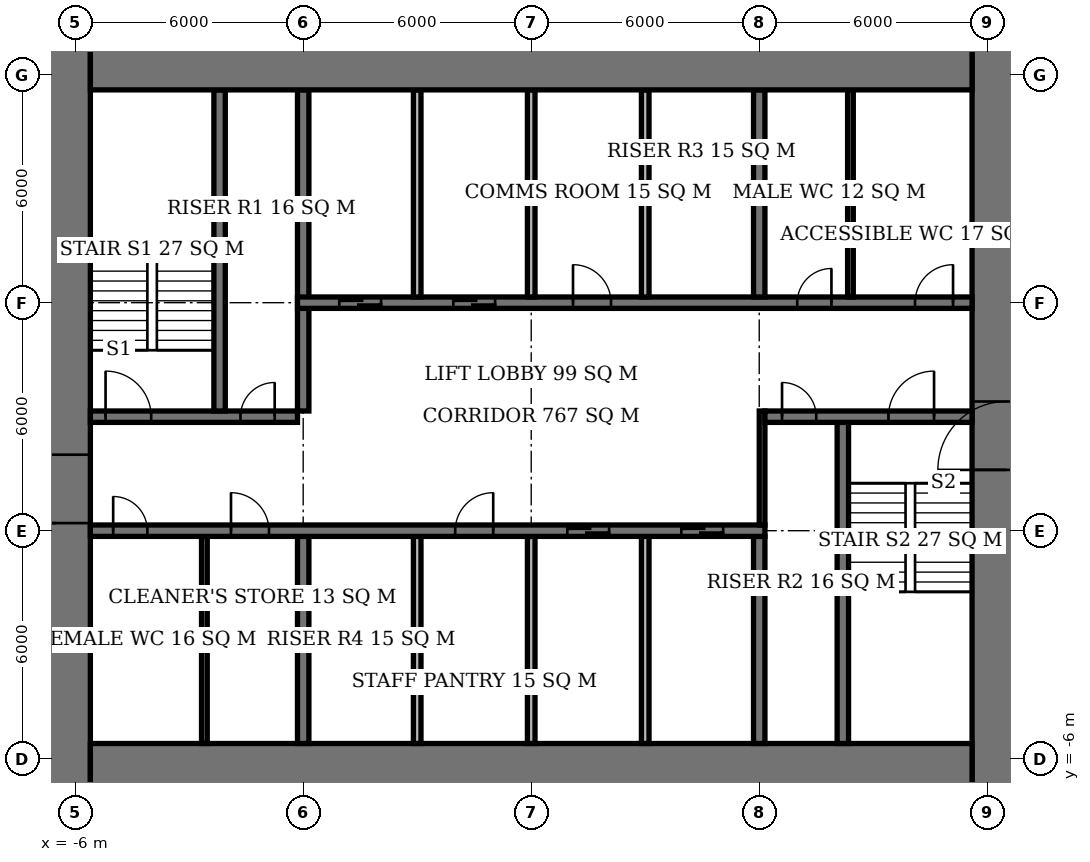
"""IFC4 building model, lengths in metres.
Left out: names, types, materials, properties, quantities, classifications, styles, units other than length and angle.
Written with IfcOpenShell. Run it as: python <this file> out.ifc"""

import sys

from ifc_helpers import new_model, si_unit, direction, frame, frame_2d, origin, place, context, subcontext, project, spatial, rectangle, extrude, element, fill, save


model = new_model("IFC4")
c1 = context("Model", 3, precision=1e-05, world=origin(), true_north=direction((0.0, 1.0)))
c2 = subcontext(c1, "Body", "Model", "MODEL_VIEW")
j1 = project(units=[si_unit("LENGTHUNIT", "METRE"), si_unit("PLANEANGLEUNIT", "RADIAN")], contexts=[c1])
p1 = place(None, origin())
s1 = spatial("IfcSite", under=j1, at=p1, CompositionType="ELEMENT")
p2 = place(p1, origin())
s2 = spatial("IfcBuilding", under=s1, at=p2, CompositionType="ELEMENT")
p3 = place(p2, frame((0.0, 0.0, 212.3)))
s3 = spatial("IfcBuildingStorey", under=s2, at=p3, CompositionType="ELEMENT", Elevation=212.3)
for number, where, z_axis, x_axis in (
    (1, (-5.6, -6.6, 0.0), (0.0, 0.0, 1.0), (1.0, 0.0, 0.0)),
    (2, (-5.6, 12.6, 0.0), (0.0, 0.0, 1.0), (1.0, 0.0, 0.0)),
):
    element("IfcWall", number, at=place(p3, frame(where, z_axis=z_axis, x_axis=x_axis)), inside=s3, PredefinedType="SHEAR", context=c2, shape_type="SweptSolid", body=[
        extrude(rectangle(XDim=23.2, YDim=2.0, at=frame_2d((11.6, 0.0))), origin(), (0.0, 0.0, 1.0), 3.9),
    ])
p4 = place(p3, frame((-6.5, -7.6, 0.0), z_axis=(0.0, 0.0, 1.0), x_axis=(0.0, 1.0, 0.0)))
e3 = element("IfcWall", 3, at=p4, inside=s3, PredefinedType="SHEAR", context=c2, shape_type="SweptSolid", body=[
    extrude(rectangle(XDim=21.2, YDim=1.8, at=frame_2d((10.6, 0.0))), origin(), (0.0, 0.0, 1.0), 3.9),
])
p5 = place(p4, frame((7.8, 0.0, 0.0)))
e4 = element("IfcOpeningElement", 4, at=p5, cuts=e3, PredefinedType="OPENING", context=c2, shape_type="SweptSolid", body=[
    extrude(rectangle(XDim=1.8, YDim=2.4, at=frame_2d((0.9, 1.2))), frame((0.0, 0.91, 0.0), z_axis=(0.0, -1.0, 0.0), x_axis=(1.0, 0.0, 0.0)), (0.0, 0.0, 1.0), 1.82),
])
p6 = place(p3, frame((18.5, -7.6, 0.0), z_axis=(0.0, 0.0, 1.0), x_axis=(0.0, 1.0, 0.0)))
e5 = element("IfcWall", 5, at=p6, inside=s3, PredefinedType="SHEAR", context=c2, shape_type="SweptSolid", body=[
    extrude(rectangle(XDim=21.2, YDim=1.8, at=frame_2d((10.6, 0.0))), origin(), (0.0, 0.0, 1.0), 3.9),
])
p7 = place(p6, frame((9.2, 0.0, 0.0)))
e6 = element("IfcOpeningElement", 6, at=p7, cuts=e5, PredefinedType="OPENING", context=c2, shape_type="SweptSolid", body=[
    extrude(rectangle(XDim=1.8, YDim=2.4, at=frame_2d((0.9, 1.2))), frame((0.0, 0.91, 0.0), z_axis=(0.0, -1.0, 0.0), x_axis=(1.0, 0.0, 0.0)), (0.0, 0.0, 1.0), 1.82),
])
p8 = place(p3, frame((-5.6, 0.0, 0.0), z_axis=(0.0, 0.0, 1.0), x_axis=(1.0, 0.0, 0.0)))
e7 = element("IfcWall", 7, at=p8, inside=s3, PredefinedType="SHEAR", context=c2, shape_type="SweptSolid", body=[
    extrude(rectangle(XDim=17.75, YDim=0.3, at=frame_2d((8.875, 0.0))), origin(), (0.0, 0.0, 1.0), 3.9),
])
p9 = place(p8, frame((0.6, 0.0, 0.0)))
e8 = element("IfcOpeningElement", 8, at=p9, cuts=e7, PredefinedType="OPENING", context=c2, shape_type="SweptSolid", body=[
    extrude(rectangle(XDim=0.9, YDim=2.1, at=frame_2d((0.45, 1.05))), frame((0.0, 0.16, 0.0), z_axis=(0.0, -1.0, 0.0), x_axis=(1.0, 0.0, 0.0)), (0.0, 0.0, 1.0), 0.32),
])
p10 = place(p8, frame((3.7, 0.0, 0.0)))
e9 = element("IfcOpeningElement", 9, at=p10, cuts=e7, PredefinedType="OPENING", context=c2, shape_type="SweptSolid", body=[
    extrude(rectangle(XDim=1.0, YDim=2.1, at=frame_2d((0.5, 1.05))), frame((0.0, 0.16, 0.0), z_axis=(0.0, -1.0, 0.0), x_axis=(1.0, 0.0, 0.0)), (0.0, 0.0, 1.0), 0.32),
])
p11 = place(p8, frame((9.6, 0.0, 0.0)))
e10 = element("IfcOpeningElement", 10, at=p11, cuts=e7, PredefinedType="OPENING", context=c2, shape_type="SweptSolid", body=[
    extrude(rectangle(XDim=1.0, YDim=2.1, at=frame_2d((0.5, 1.05))), frame((0.0, 0.16, 0.0), z_axis=(0.0, -1.0, 0.0), x_axis=(1.0, 0.0, 0.0)), (0.0, 0.0, 1.0), 0.32),
])
p12 = place(p8, frame((12.55, 0.0, 0.0)))
e11 = element("IfcOpeningElement", 11, at=p12, cuts=e7, PredefinedType="OPENING", context=c2, shape_type="SweptSolid", body=[
    extrude(rectangle(XDim=1.1, YDim=2.1, at=frame_2d((0.55, 1.05))), frame((0.0, 0.16, 0.0), z_axis=(0.0, -1.0, 0.0), x_axis=(1.0, 0.0, 0.0)), (0.0, 0.0, 1.0), 0.32),
])
p13 = place(p8, frame((15.55, 0.0, 0.0)))
e12 = element("IfcOpeningElement", 12, at=p13, cuts=e7, PredefinedType="OPENING", context=c2, shape_type="SweptSolid", body=[
    extrude(rectangle(XDim=1.1, YDim=2.1, at=frame_2d((0.55, 1.05))), frame((0.0, 0.16, 0.0), z_axis=(0.0, -1.0, 0.0), x_axis=(1.0, 0.0, 0.0)), (0.0, 0.0, 1.0), 0.32),
])
p14 = place(p3, frame((-5.6, 3.0, 0.0), z_axis=(0.0, 0.0, 1.0), x_axis=(1.0, 0.0, 0.0)))
e13 = element("IfcWall", 13, at=p14, inside=s3, PredefinedType="SHEAR", context=c2, shape_type="SweptSolid", body=[
    extrude(rectangle(XDim=5.45, YDim=0.3, at=frame_2d((2.725, 0.0))), origin(), (0.0, 0.0, 1.0), 3.9),
])
p15 = place(p14, frame((0.4, 0.0, 0.0)))
e14 = element("IfcOpeningElement", 14, at=p15, cuts=e13, PredefinedType="OPENING", context=c2, shape_type="SweptSolid", body=[
    extrude(rectangle(XDim=1.2, YDim=2.1, at=frame_2d((0.6, 1.05))), frame((0.0, 0.16, 0.0), z_axis=(0.0, -1.0, 0.0), x_axis=(1.0, 0.0, 0.0)), (0.0, 0.0, 1.0), 0.32),
])
p16 = place(p14, frame((3.95, 0.0, 0.0)))
e15 = element("IfcOpeningElement", 15, at=p16, cuts=e13, PredefinedType="OPENING", context=c2, shape_type="SweptSolid", body=[
    extrude(rectangle(XDim=0.9, YDim=2.1, at=frame_2d((0.45, 1.05))), frame((0.0, 0.16, 0.0), z_axis=(0.0, -1.0, 0.0), x_axis=(1.0, 0.0, 0.0)), (0.0, 0.0, 1.0), 0.32),
])
p17 = place(p3, frame((12.15, 3.0, 0.0), z_axis=(0.0, 0.0, 1.0), x_axis=(1.0, 0.0, 0.0)))
e16 = element("IfcWall", 16, at=p17, inside=s3, PredefinedType="SHEAR", context=c2, shape_type="SweptSolid", body=[
    extrude(rectangle(XDim=5.45, YDim=0.3, at=frame_2d((2.725, 0.0))), origin(), (0.0, 0.0, 1.0), 3.9),
])
p18 = place(p17, frame((3.25, 0.0, 0.0)))
e17 = element("IfcOpeningElement", 17, at=p18, cuts=e16, PredefinedType="OPENING", context=c2, shape_type="SweptSolid", body=[
    extrude(rectangle(XDim=1.2, YDim=2.1, at=frame_2d((0.6, 1.05))), frame((0.0, 0.16, 0.0), z_axis=(0.0, -1.0, 0.0), x_axis=(1.0, 0.0, 0.0)), (0.0, 0.0, 1.0), 0.32),
])
p19 = place(p17, frame((0.45, 0.0, 0.0)))
e18 = element("IfcOpeningElement", 18, at=p19, cuts=e16, PredefinedType="OPENING", context=c2, shape_type="SweptSolid", body=[
    extrude(rectangle(XDim=0.9, YDim=2.1, at=frame_2d((0.45, 1.05))), frame((0.0, 0.16, 0.0), z_axis=(0.0, -1.0, 0.0), x_axis=(1.0, 0.0, 0.0)), (0.0, 0.0, 1.0), 0.32),
])
p20 = place(p3, frame((-0.15, 6.0, 0.0), z_axis=(0.0, 0.0, 1.0), x_axis=(1.0, 0.0, 0.0)))
e19 = element("IfcWall", 19, at=p20, inside=s3, PredefinedType="SHEAR", context=c2, shape_type="SweptSolid", body=[
    extrude(rectangle(XDim=17.75, YDim=0.3, at=frame_2d((8.875, 0.0))), origin(), (0.0, 0.0, 1.0), 3.9),
])
p21 = place(p20, frame((13.15, 0.0, 0.0)))
e20 = element("IfcOpeningElement", 20, at=p21, cuts=e19, PredefinedType="OPENING", context=c2, shape_type="SweptSolid", body=[
    extrude(rectangle(XDim=0.9, YDim=2.1, at=frame_2d((0.45, 1.05))), frame((0.0, 0.16, 0.0), z_axis=(0.0, -1.0, 0.0), x_axis=(1.0, 0.0, 0.0)), (0.0, 0.0, 1.0), 0.32),
])
p22 = place(p20, frame((16.25, 0.0, 0.0)))
e21 = element("IfcOpeningElement", 21, at=p22, cuts=e19, PredefinedType="OPENING", context=c2, shape_type="SweptSolid", body=[
    extrude(rectangle(XDim=1.0, YDim=2.1, at=frame_2d((0.5, 1.05))), frame((0.0, 0.16, 0.0), z_axis=(0.0, -1.0, 0.0), x_axis=(1.0, 0.0, 0.0)), (0.0, 0.0, 1.0), 0.32),
])
p23 = place(p20, frame((7.25, 0.0, 0.0)))
e22 = element("IfcOpeningElement", 22, at=p23, cuts=e19, PredefinedType="OPENING", context=c2, shape_type="SweptSolid", body=[
    extrude(rectangle(XDim=1.0, YDim=2.1, at=frame_2d((0.5, 1.05))), frame((0.0, 0.16, 0.0), z_axis=(0.0, -1.0, 0.0), x_axis=(1.0, 0.0, 0.0)), (0.0, 0.0, 1.0), 0.32),
])
p24 = place(p20, frame((1.1, 0.0, 0.0)))
e23 = element("IfcOpeningElement", 23, at=p24, cuts=e19, PredefinedType="OPENING", context=c2, shape_type="SweptSolid", body=[
    extrude(rectangle(XDim=1.1, YDim=2.1, at=frame_2d((0.55, 1.05))), frame((0.0, 0.16, 0.0), z_axis=(0.0, -1.0, 0.0), x_axis=(1.0, 0.0, 0.0)), (0.0, 0.0, 1.0), 0.32),
])
p25 = place(p20, frame((4.1, 0.0, 0.0)))
e24 = element("IfcOpeningElement", 24, at=p25, cuts=e19, PredefinedType="OPENING", context=c2, shape_type="SweptSolid", body=[
    extrude(rectangle(XDim=1.1, YDim=2.1, at=frame_2d((0.55, 1.05))), frame((0.0, 0.16, 0.0), z_axis=(0.0, -1.0, 0.0), x_axis=(1.0, 0.0, 0.0)), (0.0, 0.0, 1.0), 0.32),
])
p26 = place(p3, frame((0.0, -5.6, 0.0), z_axis=(0.0, 0.0, 1.0), x_axis=(0.0, 1.0, 0.0)))
e25 = element("IfcWall", 25, at=p26, inside=s3, PredefinedType="SHEAR", context=c2, shape_type="SweptSolid", body=[
    extrude(rectangle(XDim=5.45, YDim=0.3, at=frame_2d((2.725, 0.0))), origin(), (0.0, 0.0, 1.0), 3.9),
])
p27 = place(p3, frame((0.0, 3.15, 0.0), z_axis=(0.0, 0.0, 1.0), x_axis=(0.0, 1.0, 0.0)))
e26 = element("IfcWall", 26, at=p27, inside=s3, PredefinedType="SHEAR", context=c2, shape_type="SweptSolid", body=[
    extrude(rectangle(XDim=8.45, YDim=0.3, at=frame_2d((4.225, 0.0))), origin(), (0.0, 0.0, 1.0), 3.9),
])
for number, where, z_axis, x_axis in (
    (27, (12.0, -5.6, 0.0), (0.0, 0.0, 1.0), (0.0, 1.0, 0.0)),
    (28, (12.0, 6.15, 0.0), (0.0, 0.0, 1.0), (0.0, 1.0, 0.0)),
):
    element("IfcWall", number, at=place(p3, frame(where, z_axis=z_axis, x_axis=x_axis)), inside=s3, PredefinedType="SHEAR", context=c2, shape_type="SweptSolid", body=[
        extrude(rectangle(XDim=5.45, YDim=0.3, at=frame_2d((2.725, 0.0))), origin(), (0.0, 0.0, 1.0), 3.9),
    ])
for number, where, z_axis, x_axis in (
    (29, (-2.2, 3.15, 0.0), (0.0, 0.0, 1.0), (0.0, 1.0, 0.0)),
    (30, (14.2, -5.6, 0.0), (0.0, 0.0, 1.0), (0.0, 1.0, 0.0)),
):
    element("IfcWall", number, at=place(p3, frame(where, z_axis=z_axis, x_axis=x_axis)), inside=s3, PredefinedType="SHEAR", context=c2, shape_type="SweptSolid", body=[
        extrude(rectangle(XDim=8.45, YDim=0.3, at=frame_2d((4.225, 0.0))), origin(), (0.0, 0.0, 1.0), 3.9),
    ])
for number, where, z_axis, x_axis in (
    (31, (3.0, 6.15, 0.0), (0.0, 0.0, 1.0), (0.0, 1.0, 0.0)),
    (32, (6.0, 6.15, 0.0), (0.0, 0.0, 1.0), (0.0, 1.0, 0.0)),
    (33, (9.0, 6.15, 0.0), (0.0, 0.0, 1.0), (0.0, 1.0, 0.0)),
    (34, (3.0, -5.6, 0.0), (0.0, 0.0, 1.0), (0.0, 1.0, 0.0)),
    (35, (6.0, -5.6, 0.0), (0.0, 0.0, 1.0), (0.0, 1.0, 0.0)),
    (36, (9.0, -5.6, 0.0), (0.0, 0.0, 1.0), (0.0, 1.0, 0.0)),
):
    element("IfcWall", number, at=place(p3, frame(where, z_axis=z_axis, x_axis=x_axis)), inside=s3, PredefinedType="SOLIDWALL", context=c2, shape_type="SweptSolid", body=[
        extrude(rectangle(XDim=5.45, YDim=0.2, at=frame_2d((2.725, 0.0))), origin(), (0.0, 0.0, 1.0), 3.9),
    ])
for number, where, z_axis, x_axis in (
    (37, (-2.6, -5.6, 0.0), (0.0, 0.0, 1.0), (0.0, 1.0, 0.0)),
    (38, (14.4, 6.15, 0.0), (0.0, 0.0, 1.0), (0.0, 1.0, 0.0)),
):
    element("IfcWall", number, at=place(p3, frame(where, z_axis=z_axis, x_axis=x_axis)), inside=s3, PredefinedType="PLUMBINGWALL", context=c2, shape_type="SweptSolid", body=[
        extrude(rectangle(XDim=5.45, YDim=0.15, at=frame_2d((2.725, 0.0))), origin(), (0.0, 0.0, 1.0), 3.65),
    ])
p28 = place(p3, frame((12.075, 0.15, 0.0), z_axis=(0.0, 0.0, 1.0), x_axis=(0.0, 1.0, 0.0)))
e39 = element("IfcWall", 39, at=p28, inside=s3, PredefinedType="PARTITIONING", context=c2, shape_type="SweptSolid", body=[
    extrude(rectangle(XDim=3.0, YDim=0.15, at=frame_2d((1.5, 0.0))), origin(), (0.0, 0.0, 1.0), 3.65),
])
p29 = place(p5, origin())
e40 = element("IfcDoor", 40, at=p29, inside=s3, OperationType="DOUBLE_DOOR_SINGLE_SWING", PredefinedType="DOOR", context=c2, shape_type="SweptSolid", body=[
    extrude(rectangle(XDim=1.8, YDim=2.4, at=frame_2d((0.9, 1.2))), frame((0.0, 0.025, 0.0), z_axis=(0.0, -1.0, 0.0), x_axis=(1.0, 0.0, 0.0)), (0.0, 0.0, 1.0), 0.05),
])
fill(e4, e40)
p30 = place(p7, origin())
e41 = element("IfcDoor", 41, at=p30, inside=s3, OperationType="DOUBLE_DOOR_SINGLE_SWING", PredefinedType="DOOR", context=c2, shape_type="SweptSolid", body=[
    extrude(rectangle(XDim=1.8, YDim=2.4, at=frame_2d((0.9, 1.2))), frame((0.0, 0.025, 0.0), z_axis=(0.0, -1.0, 0.0), x_axis=(1.0, 0.0, 0.0)), (0.0, 0.0, 1.0), 0.05),
])
fill(e6, e41)
p31 = place(p15, origin())
e42 = element("IfcDoor", 42, at=p31, inside=s3, OperationType="SINGLE_SWING_LEFT", PredefinedType="DOOR", context=c2, shape_type="SweptSolid", body=[
    extrude(rectangle(XDim=1.2, YDim=2.1, at=frame_2d((0.6, 1.05))), frame((0.0, 0.025, 0.0), z_axis=(0.0, -1.0, 0.0), x_axis=(1.0, 0.0, 0.0)), (0.0, 0.0, 1.0), 0.05),
])
fill(e14, e42)
p32 = place(p16, origin())
e43 = element("IfcDoor", 43, at=p32, inside=s3, OperationType="SINGLE_SWING_RIGHT", PredefinedType="DOOR", context=c2, shape_type="SweptSolid", body=[
    extrude(rectangle(XDim=0.9, YDim=2.1, at=frame_2d((0.45, 1.05))), frame((0.0, 0.025, 0.0), z_axis=(0.0, -1.0, 0.0), x_axis=(1.0, 0.0, 0.0)), (0.0, 0.0, 1.0), 0.05),
])
fill(e15, e43)
p33 = place(p18, origin())
e44 = element("IfcDoor", 44, at=p33, inside=s3, OperationType="SINGLE_SWING_RIGHT", PredefinedType="DOOR", context=c2, shape_type="SweptSolid", body=[
    extrude(rectangle(XDim=1.2, YDim=2.1, at=frame_2d((0.6, 1.05))), frame((0.0, 0.025, 0.0), z_axis=(0.0, -1.0, 0.0), x_axis=(1.0, 0.0, 0.0)), (0.0, 0.0, 1.0), 0.05),
])
fill(e17, e44)
p34 = place(p19, origin())
e45 = element("IfcDoor", 45, at=p34, inside=s3, OperationType="SINGLE_SWING_LEFT", PredefinedType="DOOR", context=c2, shape_type="SweptSolid", body=[
    extrude(rectangle(XDim=0.9, YDim=2.1, at=frame_2d((0.45, 1.05))), frame((0.0, 0.025, 0.0), z_axis=(0.0, -1.0, 0.0), x_axis=(1.0, 0.0, 0.0)), (0.0, 0.0, 1.0), 0.05),
])
fill(e18, e45)
p35 = place(p9, origin())
e46 = element("IfcDoor", 46, at=p35, inside=s3, OperationType="SINGLE_SWING_LEFT", PredefinedType="DOOR", context=c2, shape_type="SweptSolid", body=[
    extrude(rectangle(XDim=0.9, YDim=2.1, at=frame_2d((0.45, 1.05))), frame((0.0, 0.025, 0.0), z_axis=(0.0, -1.0, 0.0), x_axis=(1.0, 0.0, 0.0)), (0.0, 0.0, 1.0), 0.05),
])
fill(e8, e46)
p36 = place(p10, origin())
e47 = element("IfcDoor", 47, at=p36, inside=s3, OperationType="SINGLE_SWING_LEFT", PredefinedType="DOOR", context=c2, shape_type="SweptSolid", body=[
    extrude(rectangle(XDim=1.0, YDim=2.1, at=frame_2d((0.5, 1.05))), frame((0.0, 0.025, 0.0), z_axis=(0.0, -1.0, 0.0), x_axis=(1.0, 0.0, 0.0)), (0.0, 0.0, 1.0), 0.05),
])
fill(e9, e47)
p37 = place(p21, origin())
e48 = element("IfcDoor", 48, at=p37, inside=s3, OperationType="SINGLE_SWING_RIGHT", PredefinedType="DOOR", context=c2, shape_type="SweptSolid", body=[
    extrude(rectangle(XDim=0.9, YDim=2.1, at=frame_2d((0.45, 1.05))), frame((0.0, 0.025, 0.0), z_axis=(0.0, -1.0, 0.0), x_axis=(1.0, 0.0, 0.0)), (0.0, 0.0, 1.0), 0.05),
])
fill(e20, e48)
p38 = place(p22, origin())
e49 = element("IfcDoor", 49, at=p38, inside=s3, OperationType="SINGLE_SWING_RIGHT", PredefinedType="DOOR", context=c2, shape_type="SweptSolid", body=[
    extrude(rectangle(XDim=1.0, YDim=2.1, at=frame_2d((0.5, 1.05))), frame((0.0, 0.025, 0.0), z_axis=(0.0, -1.0, 0.0), x_axis=(1.0, 0.0, 0.0)), (0.0, 0.0, 1.0), 0.05),
])
fill(e21, e49)
p39 = place(p23, origin())
e50 = element("IfcDoor", 50, at=p39, inside=s3, OperationType="SINGLE_SWING_LEFT", PredefinedType="DOOR", context=c2, shape_type="SweptSolid", body=[
    extrude(rectangle(XDim=1.0, YDim=2.1, at=frame_2d((0.5, 1.05))), frame((0.0, 0.025, 0.0), z_axis=(0.0, -1.0, 0.0), x_axis=(1.0, 0.0, 0.0)), (0.0, 0.0, 1.0), 0.05),
])
fill(e22, e50)
p40 = place(p11, origin())
e51 = element("IfcDoor", 51, at=p40, inside=s3, OperationType="SINGLE_SWING_RIGHT", PredefinedType="DOOR", context=c2, shape_type="SweptSolid", body=[
    extrude(rectangle(XDim=1.0, YDim=2.1, at=frame_2d((0.5, 1.05))), frame((0.0, 0.025, 0.0), z_axis=(0.0, -1.0, 0.0), x_axis=(1.0, 0.0, 0.0)), (0.0, 0.0, 1.0), 0.05),
])
fill(e10, e51)
p41 = place(p24, origin())
e52 = element("IfcDoor", 52, at=p41, inside=s3, OperationType="DOUBLE_DOOR_SLIDING", PredefinedType="USERDEFINED", context=c2, shape_type="SweptSolid", body=[
    extrude(rectangle(XDim=1.1, YDim=2.1, at=frame_2d((0.55, 1.05))), frame((0.0, 0.025, 0.0), z_axis=(0.0, -1.0, 0.0), x_axis=(1.0, 0.0, 0.0)), (0.0, 0.0, 1.0), 0.05),
])
fill(e23, e52)
p42 = place(p25, origin())
e53 = element("IfcDoor", 53, at=p42, inside=s3, OperationType="DOUBLE_DOOR_SLIDING", PredefinedType="USERDEFINED", context=c2, shape_type="SweptSolid", body=[
    extrude(rectangle(XDim=1.1, YDim=2.1, at=frame_2d((0.55, 1.05))), frame((0.0, 0.025, 0.0), z_axis=(0.0, -1.0, 0.0), x_axis=(1.0, 0.0, 0.0)), (0.0, 0.0, 1.0), 0.05),
])
fill(e24, e53)
p43 = place(p12, origin())
e54 = element("IfcDoor", 54, at=p43, inside=s3, OperationType="DOUBLE_DOOR_SLIDING", PredefinedType="USERDEFINED", context=c2, shape_type="SweptSolid", body=[
    extrude(rectangle(XDim=1.1, YDim=2.1, at=frame_2d((0.55, 1.05))), frame((0.0, 0.025, 0.0), z_axis=(0.0, -1.0, 0.0), x_axis=(1.0, 0.0, 0.0)), (0.0, 0.0, 1.0), 0.05),
])
fill(e11, e54)
p44 = place(p13, origin())
e55 = element("IfcDoor", 55, at=p44, inside=s3, OperationType="DOUBLE_DOOR_SLIDING", PredefinedType="USERDEFINED", context=c2, shape_type="SweptSolid", body=[
    extrude(rectangle(XDim=1.1, YDim=2.1, at=frame_2d((0.55, 1.05))), frame((0.0, 0.025, 0.0), z_axis=(0.0, -1.0, 0.0), x_axis=(1.0, 0.0, 0.0)), (0.0, 0.0, 1.0), 0.05),
])
fill(e12, e55)
save(model, sys.argv[1])
